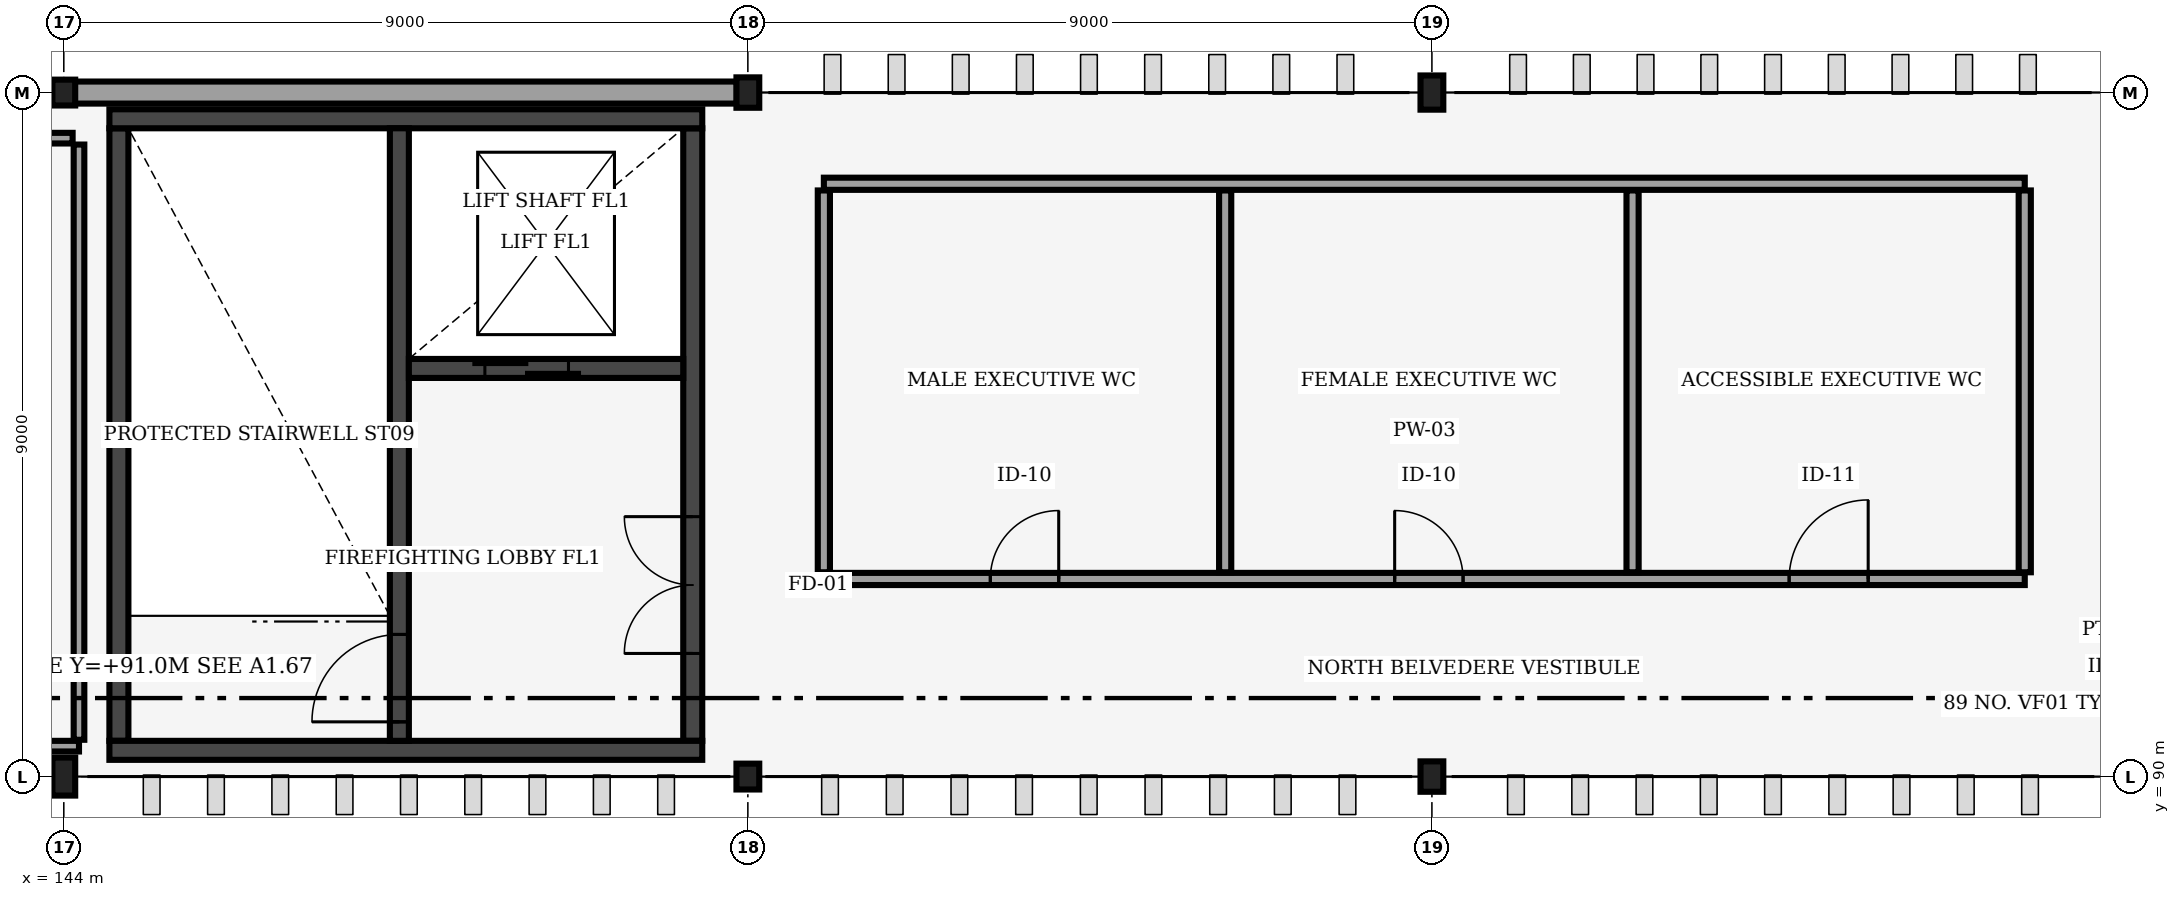
"""IFC4 building model, lengths in metres.
Left out: names, types, materials, properties, quantities, classifications, styles, units other than length and angle.
Written with IfcOpenShell. Run it as: python <this file> out.ifc"""

import sys

from ifc_helpers import new_model, si_unit, direction, frame, frame_2d, origin, origin_2d, place, context, subcontext, project, spatial, rectangle, i_section, extrude, element, fill, save


model = new_model("IFC4")
c1 = context("Model", 3, precision=1e-05, world=origin(), true_north=direction((0.0, 1.0)))
c2 = subcontext(c1, "Body", "Model", "MODEL_VIEW")
j1 = project(units=[si_unit("LENGTHUNIT", "METRE"), si_unit("PLANEANGLEUNIT", "RADIAN")], contexts=[c1])
p1 = place(None, origin())
s1 = spatial("IfcSite", under=j1, at=p1, CompositionType="ELEMENT")
p2 = place(p1, origin())
s2 = spatial("IfcBuilding", under=s1, at=p2, CompositionType="ELEMENT")
p3 = place(p2, frame((0.0, 0.0, 26.8)))
s3 = spatial("IfcBuildingStorey", under=s2, at=p3, CompositionType="ELEMENT", Elevation=26.8)
p4 = place(p3, frame((144.0, 90.0, 0.0), z_axis=(0.0, 0.0, 1.0), x_axis=(1.0, 0.0, 0.0)))
e1 = element("IfcColumn", 1, at=p4, inside=s3, PredefinedType="COLUMN", context=c2, shape_type="SweptSolid", body=[
    extrude(i_section(OverallWidth=0.3, OverallDepth=0.5, WebThickness=0.014, FlangeThickness=0.028, FilletRadius=0.027, at=origin_2d()), origin(), (0.0, 0.0, 1.0), 3.0),
])
for number, where, z_axis, x_axis in (
    (2, (144.0, 99.0, 0.0), (0.0, 0.0, 1.0), (1.0, 0.0, 0.0)),
    (3, (153.0, 90.0, 0.0), (0.0, 0.0, 1.0), (1.0, 0.0, 0.0)),
):
    element("IfcColumn", number, at=place(p3, frame(where, z_axis=z_axis, x_axis=x_axis)), inside=s3, PredefinedType="COLUMN", context=c2, shape_type="SweptSolid", body=[
        extrude(i_section(OverallWidth=0.3, OverallDepth=0.34, WebThickness=0.012, FlangeThickness=0.021, FilletRadius=0.027, at=origin_2d()), origin(), (0.0, 0.0, 1.0), 3.0),
    ])
for number, where, z_axis, x_axis in (
    (4, (153.0, 99.0, 0.0), (0.0, 0.0, 1.0), (1.0, 0.0, 0.0)),
    (5, (162.0, 90.0, 0.0), (0.0, 0.0, 1.0), (1.0, 0.0, 0.0)),
):
    element("IfcColumn", number, at=place(p3, frame(where, z_axis=z_axis, x_axis=x_axis)), inside=s3, PredefinedType="COLUMN", context=c2, shape_type="SweptSolid", body=[
        extrude(i_section(OverallWidth=0.3, OverallDepth=0.4, WebThickness=0.013, FlangeThickness=0.024, FilletRadius=0.027, at=origin_2d()), origin(), (0.0, 0.0, 1.0), 3.0),
    ])
p5 = place(p3, frame((162.0, 99.0, 0.0), z_axis=(0.0, 0.0, 1.0), x_axis=(1.0, 0.0, 0.0)))
e6 = element("IfcColumn", 6, at=p5, inside=s3, PredefinedType="COLUMN", context=c2, shape_type="SweptSolid", body=[
    extrude(i_section(OverallWidth=0.3, OverallDepth=0.45, WebThickness=0.014, FlangeThickness=0.026, FilletRadius=0.027, at=origin_2d()), origin(), (0.0, 0.0, 1.0), 3.0),
])
p6 = place(p3, frame((144.145, 99.0, 0.0), z_axis=(0.0, 0.0, 1.0), x_axis=(1.0, 0.0, 0.0)))
e7 = element("IfcWall", 7, at=p6, inside=s3, PredefinedType="SOLIDWALL", context=c2, shape_type="SweptSolid", body=[
    extrude(rectangle(XDim=8.71, YDim=0.29, at=frame_2d((4.355, 0.0))), origin(), (0.0, 0.0, 1.0), 1.9),
])
p7 = place(p3, frame((144.725, 90.47, 0.0), z_axis=(0.0, 0.0, 1.0), x_axis=(0.0, 1.0, 0.0)))
e8 = element("IfcWall", 8, at=p7, inside=s3, PredefinedType="SHEAR", context=c2, shape_type="SweptSolid", body=[
    extrude(rectangle(XDim=8.06, YDim=0.25, at=frame_2d((4.03, 0.0))), origin(), (0.0, 0.0, 1.0), 2.64),
])
p8 = place(p3, frame((152.275, 90.47, 0.0), z_axis=(0.0, 0.0, 1.0), x_axis=(0.0, 1.0, 0.0)))
e9 = element("IfcWall", 9, at=p8, inside=s3, PredefinedType="SHEAR", context=c2, shape_type="SweptSolid", body=[
    extrude(rectangle(XDim=8.06, YDim=0.25, at=frame_2d((4.03, 0.0))), origin(), (0.0, 0.0, 1.0), 2.64),
])
p9 = place(p8, frame((1.15, 0.0, 0.0)))
e10 = element("IfcOpeningElement", 10, at=p9, cuts=e9, PredefinedType="OPENING", context=c2, shape_type="SweptSolid", body=[
    extrude(rectangle(XDim=1.8, YDim=2.2, at=frame_2d((0.9, 1.1))), frame((0.0, 0.135, 0.0), z_axis=(0.0, -1.0, 0.0), x_axis=(1.0, 0.0, 0.0)), (0.0, 0.0, 1.0), 0.27),
])
for number, where, z_axis, x_axis in (
    (11, (144.6, 90.345, 0.0), (0.0, 0.0, 1.0), (1.0, 0.0, 0.0)),
    (12, (144.6, 98.655, 0.0), (0.0, 0.0, 1.0), (1.0, 0.0, 0.0)),
):
    element("IfcWall", number, at=place(p3, frame(where, z_axis=z_axis, x_axis=x_axis)), inside=s3, PredefinedType="SHEAR", context=c2, shape_type="SweptSolid", body=[
        extrude(rectangle(XDim=7.8, YDim=0.25, at=frame_2d((3.9, 0.0))), origin(), (0.0, 0.0, 1.0), 2.64),
    ])
p10 = place(p3, frame((148.415, 90.47, 0.0), z_axis=(0.0, 0.0, 1.0), x_axis=(0.0, 1.0, 0.0)))
e13 = element("IfcWall", 13, at=p10, inside=s3, PredefinedType="SHEAR", context=c2, shape_type="SweptSolid", body=[
    extrude(rectangle(XDim=8.06, YDim=0.25, at=frame_2d((4.03, 0.0))), origin(), (0.0, 0.0, 1.0), 2.64),
])
p11 = place(p10, frame((0.25, 0.0, 0.0)))
e14 = element("IfcOpeningElement", 14, at=p11, cuts=e13, PredefinedType="OPENING", context=c2, shape_type="SweptSolid", body=[
    extrude(rectangle(XDim=1.15, YDim=2.15, at=frame_2d((0.575, 1.075))), frame((0.0, 0.135, 0.0), z_axis=(0.0, -1.0, 0.0), x_axis=(1.0, 0.0, 0.0)), (0.0, 0.0, 1.0), 0.27),
])
p12 = place(p3, frame((148.54, 95.37, 0.0), z_axis=(0.0, 0.0, 1.0), x_axis=(1.0, 0.0, 0.0)))
e15 = element("IfcWall", 15, at=p12, inside=s3, PredefinedType="SHEAR", context=c2, shape_type="SweptSolid", body=[
    extrude(rectangle(XDim=3.61, YDim=0.25, at=frame_2d((1.805, 0.0))), origin(), (0.0, 0.0, 1.0), 2.64),
])
p13 = place(p12, frame((1.0, 0.0, 0.0)))
e16 = element("IfcOpeningElement", 16, at=p13, cuts=e15, PredefinedType="OPENING", context=c2, shape_type="SweptSolid", body=[
    extrude(rectangle(XDim=1.1, YDim=2.1, at=frame_2d((0.55, 1.05))), frame((0.0, 0.135, 0.0), z_axis=(0.0, -1.0, 0.0), x_axis=(1.0, 0.0, 0.0)), (0.0, 0.0, 1.0), 0.27),
])
p14 = place(p3, frame((154.0, 92.6, 0.0), z_axis=(0.0, 0.0, 1.0), x_axis=(1.0, 0.0, 0.0)))
e17 = element("IfcWall", 17, at=p14, inside=s3, PredefinedType="PLUMBINGWALL", context=c2, shape_type="SweptSolid", body=[
    extrude(rectangle(XDim=15.8, YDim=0.16, at=frame_2d((7.9, 0.0))), origin(), (0.0, 0.0, 1.0), 2.35),
])
p15 = place(p14, frame((2.19, 0.0, 0.0)))
e18 = element("IfcOpeningElement", 18, at=p15, cuts=e17, PredefinedType="OPENING", context=c2, shape_type="SweptSolid", body=[
    extrude(rectangle(XDim=0.9, YDim=2.1, at=frame_2d((0.45, 1.05))), frame((0.0, 0.09, 0.0), z_axis=(0.0, -1.0, 0.0), x_axis=(1.0, 0.0, 0.0)), (0.0, 0.0, 1.0), 0.18),
])
p16 = place(p14, frame((7.51, 0.0, 0.0)))
e19 = element("IfcOpeningElement", 19, at=p16, cuts=e17, PredefinedType="OPENING", context=c2, shape_type="SweptSolid", body=[
    extrude(rectangle(XDim=0.9, YDim=2.1, at=frame_2d((0.45, 1.05))), frame((0.0, 0.09, 0.0), z_axis=(0.0, -1.0, 0.0), x_axis=(1.0, 0.0, 0.0)), (0.0, 0.0, 1.0), 0.18),
])
p17 = place(p14, frame((12.7, 0.0, 0.0)))
e20 = element("IfcOpeningElement", 20, at=p17, cuts=e17, PredefinedType="OPENING", context=c2, shape_type="SweptSolid", body=[
    extrude(rectangle(XDim=1.04, YDim=2.15, at=frame_2d((0.52, 1.075))), frame((0.0, 0.09, 0.0), z_axis=(0.0, -1.0, 0.0), x_axis=(1.0, 0.0, 0.0)), (0.0, 0.0, 1.0), 0.18),
])
p18 = place(p3, frame((154.0, 97.8, 0.0), z_axis=(0.0, 0.0, 1.0), x_axis=(1.0, 0.0, 0.0)))
e21 = element("IfcWall", 21, at=p18, inside=s3, PredefinedType="PLUMBINGWALL", context=c2, shape_type="SweptSolid", body=[
    extrude(rectangle(XDim=15.8, YDim=0.16, at=frame_2d((7.9, 0.0))), origin(), (0.0, 0.0, 1.0), 2.35),
])
for number, where, z_axis, x_axis in (
    (22, (154.0, 92.688, 0.0), (0.0, 0.0, 1.0), (0.0, 1.0, 0.0)),
    (23, (159.28, 92.688, 0.0), (0.0, 0.0, 1.0), (0.0, 1.0, 0.0)),
    (24, (164.64, 92.688, 0.0), (0.0, 0.0, 1.0), (0.0, 1.0, 0.0)),
    (25, (169.8, 92.688, 0.0), (0.0, 0.0, 1.0), (0.0, 1.0, 0.0)),
):
    element("IfcWall", number, at=place(p3, frame(where, z_axis=z_axis, x_axis=x_axis)), inside=s3, PredefinedType="PLUMBINGWALL", context=c2, shape_type="SweptSolid", body=[
        extrude(rectangle(XDim=5.024, YDim=0.16, at=frame_2d((2.512, 0.0))), origin(), (0.0, 0.0, 1.0), 2.35),
    ])
p19 = place(p3, frame((131.0, 90.4, 0.0), z_axis=(0.0, 0.0, 1.0), x_axis=(1.0, 0.0, 0.0)))
e26 = element("IfcWall", 26, at=p19, inside=s3, PredefinedType="PARTITIONING", context=c2, shape_type="SweptSolid", body=[
    extrude(rectangle(XDim=13.2, YDim=0.14, at=frame_2d((6.6, 0.0))), origin(), (0.0, 0.0, 1.0), 2.35),
])
p20 = place(p19, frame((0.25, 0.0, 0.0)))
e27 = element("IfcOpeningElement", 27, at=p20, cuts=e26, PredefinedType="OPENING", context=c2, shape_type="SweptSolid", body=[
    extrude(rectangle(XDim=0.94, YDim=2.1, at=frame_2d((0.47, 1.05))), frame((0.0, 0.08, 0.0), z_axis=(0.0, -1.0, 0.0), x_axis=(1.0, 0.0, 0.0)), (0.0, 0.0, 1.0), 0.16),
])
p21 = place(p3, frame((131.084, 98.4, 0.0), z_axis=(0.0, 0.0, 1.0), x_axis=(1.0, 0.0, 0.0)))
e28 = element("IfcWall", 28, at=p21, inside=s3, PredefinedType="PARTITIONING", context=c2, shape_type="SweptSolid", body=[
    extrude(rectangle(XDim=13.032, YDim=0.14, at=frame_2d((6.516, 0.0))), origin(), (0.0, 0.0, 1.0), 2.35),
])
p22 = place(p3, frame((144.2, 90.484, 0.0), z_axis=(0.0, 0.0, 1.0), x_axis=(0.0, 1.0, 0.0)))
e29 = element("IfcWall", 29, at=p22, inside=s3, PredefinedType="PARTITIONING", context=c2, shape_type="SweptSolid", body=[
    extrude(rectangle(XDim=7.832, YDim=0.14, at=frame_2d((3.916, 0.0))), origin(), (0.0, 0.0, 1.0), 2.35),
])
p23 = place(p11, origin())
e30 = element("IfcDoor", 30, at=p23, inside=s3, OperationType="SINGLE_SWING_LEFT", PredefinedType="DOOR", context=c2, shape_type="SweptSolid", body=[
    extrude(rectangle(XDim=1.15, YDim=2.15, at=frame_2d((0.575, 1.075))), frame((0.0, 0.025, 0.0), z_axis=(0.0, -1.0, 0.0), x_axis=(1.0, 0.0, 0.0)), (0.0, 0.0, 1.0), 0.05),
])
fill(e14, e30)
p24 = place(p13, origin())
e31 = element("IfcDoor", 31, at=p24, inside=s3, OperationType="DOUBLE_DOOR_SLIDING", PredefinedType="DOOR", context=c2, shape_type="SweptSolid", body=[
    extrude(rectangle(XDim=1.1, YDim=2.1, at=frame_2d((0.55, 1.05))), frame((0.0, 0.025, 0.0), z_axis=(0.0, -1.0, 0.0), x_axis=(1.0, 0.0, 0.0)), (0.0, 0.0, 1.0), 0.05),
])
fill(e16, e31)
p25 = place(p9, origin())
e32 = element("IfcDoor", 32, at=p25, inside=s3, OperationType="DOUBLE_DOOR_SINGLE_SWING", PredefinedType="DOOR", context=c2, shape_type="SweptSolid", body=[
    extrude(rectangle(XDim=1.8, YDim=2.2, at=frame_2d((0.9, 1.1))), frame((0.0, 0.025, 0.0), z_axis=(0.0, -1.0, 0.0), x_axis=(1.0, 0.0, 0.0)), (0.0, 0.0, 1.0), 0.05),
])
fill(e10, e32)
p26 = place(p15, origin())
e33 = element("IfcDoor", 33, at=p26, inside=s3, OperationType="SINGLE_SWING_RIGHT", PredefinedType="DOOR", context=c2, shape_type="SweptSolid", body=[
    extrude(rectangle(XDim=0.9, YDim=2.1, at=frame_2d((0.45, 1.05))), frame((0.0, 0.025, 0.0), z_axis=(0.0, -1.0, 0.0), x_axis=(1.0, 0.0, 0.0)), (0.0, 0.0, 1.0), 0.05),
])
fill(e18, e33)
p27 = place(p16, origin())
e34 = element("IfcDoor", 34, at=p27, inside=s3, OperationType="SINGLE_SWING_LEFT", PredefinedType="DOOR", context=c2, shape_type="SweptSolid", body=[
    extrude(rectangle(XDim=0.9, YDim=2.1, at=frame_2d((0.45, 1.05))), frame((0.0, 0.025, 0.0), z_axis=(0.0, -1.0, 0.0), x_axis=(1.0, 0.0, 0.0)), (0.0, 0.0, 1.0), 0.05),
])
fill(e19, e34)
p28 = place(p17, origin())
e35 = element("IfcDoor", 35, at=p28, inside=s3, OperationType="SINGLE_SWING_RIGHT", PredefinedType="DOOR", context=c2, shape_type="SweptSolid", body=[
    extrude(rectangle(XDim=1.04, YDim=2.15, at=frame_2d((0.52, 1.075))), frame((0.0, 0.025, 0.0), z_axis=(0.0, -1.0, 0.0), x_axis=(1.0, 0.0, 0.0)), (0.0, 0.0, 1.0), 0.05),
])
fill(e20, e35)
save(model, sys.argv[1])
